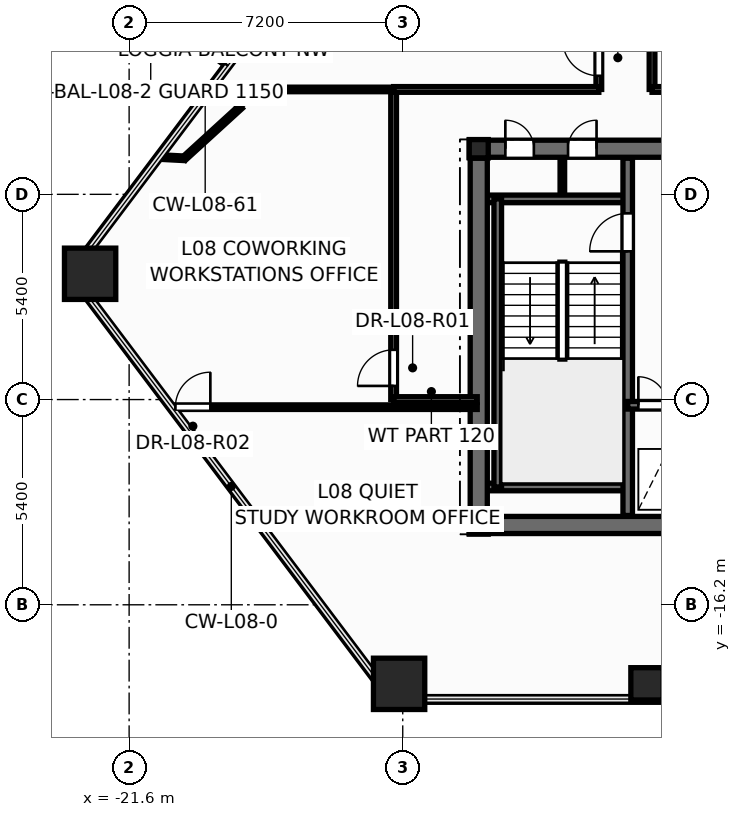
"""IFC4 building model, lengths in metres.
Left out: names, types, materials, properties, quantities, classifications, styles, units other than length and angle.
Written with IfcOpenShell. Run it as: python <this file> out.ifc"""

import sys

from ifc_helpers import new_model, si_unit, direction, frame, frame_2d, origin, origin_2d, place, context, subcontext, project, spatial, rectangle, hollow_rectangle, hollow_circle, i_section, extrude, element, fill, save


model = new_model("IFC4")
c1 = context("Model", 3, precision=1e-05, world=origin(), true_north=direction((0.0, 1.0)))
c2 = subcontext(c1, "Body", "Model", "MODEL_VIEW")
j1 = project(units=[si_unit("LENGTHUNIT", "METRE"), si_unit("PLANEANGLEUNIT", "RADIAN")], contexts=[c1])
p1 = place(None, origin())
s1 = spatial("IfcSite", under=j1, at=p1, CompositionType="ELEMENT")
p2 = place(p1, origin())
s2 = spatial("IfcBuilding", under=s1, at=p2, CompositionType="ELEMENT")
p3 = place(p2, frame((0.0, 0.0, 35.1)))
s3 = spatial("IfcBuildingStorey", under=s2, at=p3, CompositionType="ELEMENT", Elevation=35.1)
for number, where, z_axis, x_axis in (
    (1, (-22.626, -7.49, 0.0), (0.0, 0.0, 1.0), (1.0, 0.0, 0.0)),
    (2, (-14.496, -18.28, 0.0), (0.0, 0.0, 1.0), (1.0, 0.0, 0.0)),
):
    element("IfcColumn", number, at=place(p3, frame(where, z_axis=z_axis, x_axis=x_axis)), inside=s3, PredefinedType="COLUMN", context=c2, shape_type="SweptSolid", body=[
        extrude(hollow_rectangle(XDim=1.35, YDim=1.35, WallThickness=0.065, at=origin_2d()), origin(), (0.0, 0.0, 1.0), 3.6),
    ])
p4 = place(p3, frame((-7.973, -18.28, 0.0), z_axis=(0.0, 0.0, 1.0), x_axis=(1.0, 0.0, 0.0)))
e3 = element("IfcColumn", 3, at=p4, inside=s3, PredefinedType="COLUMN", context=c2, shape_type="SweptSolid", body=[
    extrude(hollow_circle(Radius=0.425, WallThickness=0.038, at=origin_2d()), origin(), (0.0, 0.0, 1.0), 3.6),
])
for number, where, z_axis, x_axis in (
    (4, (-12.4, -14.1, 0.0), (0.0, 0.0, 1.0), (1.0, 0.0, 0.0)),
    (5, (-12.4, -4.2, 0.0), (0.0, 0.0, 1.0), (1.0, 0.0, 0.0)),
):
    element("IfcColumn", number, at=place(p3, frame(where, z_axis=z_axis, x_axis=x_axis)), inside=s3, PredefinedType="COLUMN", context=c2, shape_type="SweptSolid", body=[
        extrude(i_section(OverallWidth=0.5, OverallDepth=0.482, WebThickness=0.04, FlangeThickness=0.045, at=origin_2d()), origin(), (0.0, 0.0, 1.0), 3.6),
    ])
p5 = place(p3, frame((-10.2, -5.52, 0.0), z_axis=(0.0, 0.0, 1.0), x_axis=(0.0, 1.0, 0.0)))
e6 = element("IfcWall", 6, at=p5, inside=s3, PredefinedType="PARTITIONING", context=c2, shape_type="SweptSolid", body=[
    extrude(rectangle(XDim=1.12, YDim=0.12, at=frame_2d((0.56, 0.0))), origin(), (0.0, 0.0, 1.0), 3.35),
])
p6 = place(p3, frame((-12.65, -14.1, 0.0), z_axis=(0.0, 0.0, 1.0), x_axis=(1.0, 0.0, 0.0)))
e7 = element("IfcWall", 7, at=p6, inside=s3, PredefinedType="SHEAR", context=c2, shape_type="SweptSolid", body=[
    extrude(rectangle(XDim=25.3, YDim=0.45, at=frame_2d((12.65, 0.0))), origin(), (0.0, 0.0, 1.0), 3.6),
])
p7 = place(p3, frame((-12.65, -4.2, 0.0), z_axis=(0.0, 0.0, 1.0), x_axis=(1.0, 0.0, 0.0)))
e8 = element("IfcWall", 8, at=p7, inside=s3, PredefinedType="SHEAR", context=c2, shape_type="SweptSolid", body=[
    extrude(rectangle(XDim=25.3, YDim=0.45, at=frame_2d((12.65, 0.0))), origin(), (0.0, 0.0, 1.0), 3.6),
])
p8 = place(p7, frame((0.95, 0.0, 0.0)))
e9 = element("IfcOpeningElement", 9, at=p8, cuts=e8, PredefinedType="OPENING", context=c2, shape_type="SweptSolid", body=[
    extrude(rectangle(XDim=0.756, YDim=2.054, at=frame_2d((0.375, 1.027))), frame((0.0, 0.235, 0.0), z_axis=(0.0, -1.0, 0.0), x_axis=(1.0, 0.0, 0.0)), (0.0, 0.0, 1.0), 0.47),
])
p9 = place(p7, frame((2.6, 0.0, 0.0)))
e10 = element("IfcOpeningElement", 10, at=p9, cuts=e8, PredefinedType="OPENING", context=c2, shape_type="SweptSolid", body=[
    extrude(rectangle(XDim=0.756, YDim=2.054, at=frame_2d((0.375, 1.027))), frame((0.0, 0.235, 0.0), z_axis=(0.0, -1.0, 0.0), x_axis=(1.0, 0.0, 0.0)), (0.0, 0.0, 1.0), 0.47),
])
p10 = place(p7, frame((21.85, 0.0, 0.0)))
e11 = element("IfcOpeningElement", 11, at=p10, cuts=e8, PredefinedType="OPENING", context=c2, shape_type="SweptSolid", body=[
    extrude(rectangle(XDim=0.756, YDim=2.054, at=frame_2d((0.375, 1.027))), frame((0.0, 0.235, 0.0), z_axis=(0.0, -1.0, 0.0), x_axis=(1.0, 0.0, 0.0)), (0.0, 0.0, 1.0), 0.47),
])
p11 = place(p7, frame((23.5, 0.0, 0.0)))
e12 = element("IfcOpeningElement", 12, at=p11, cuts=e8, PredefinedType="OPENING", context=c2, shape_type="SweptSolid", body=[
    extrude(rectangle(XDim=0.756, YDim=2.054, at=frame_2d((0.375, 1.027))), frame((0.0, 0.235, 0.0), z_axis=(0.0, -1.0, 0.0), x_axis=(1.0, 0.0, 0.0)), (0.0, 0.0, 1.0), 0.47),
])
p12 = place(p7, frame((5.85, 0.0, 0.0)))
e13 = element("IfcOpeningElement", 13, at=p12, cuts=e8, PredefinedType="OPENING", context=c2, shape_type="SweptSolid", body=[
    extrude(rectangle(XDim=1.006, YDim=2.104, at=frame_2d((0.5, 1.052))), frame((0.0, 0.235, 0.0), z_axis=(0.0, -1.0, 0.0), x_axis=(1.0, 0.0, 0.0)), (0.0, 0.0, 1.0), 0.47),
])
p13 = place(p7, frame((10.35, 0.0, 0.0)))
e14 = element("IfcOpeningElement", 14, at=p13, cuts=e8, PredefinedType="OPENING", context=c2, shape_type="SweptSolid", body=[
    extrude(rectangle(XDim=1.406, YDim=2.154, at=frame_2d((0.7, 1.077))), frame((0.0, 0.235, 0.0), z_axis=(0.0, -1.0, 0.0), x_axis=(1.0, 0.0, 0.0)), (0.0, 0.0, 1.0), 0.47),
])
p14 = place(p7, frame((18.45, 0.0, 0.0)))
e15 = element("IfcOpeningElement", 15, at=p14, cuts=e8, PredefinedType="OPENING", context=c2, shape_type="SweptSolid", body=[
    extrude(rectangle(XDim=1.006, YDim=2.104, at=frame_2d((0.5, 1.052))), frame((0.0, 0.235, 0.0), z_axis=(0.0, -1.0, 0.0), x_axis=(1.0, 0.0, 0.0)), (0.0, 0.0, 1.0), 0.47),
])
for number, where, z_axis, x_axis in (
    (16, (-12.35, -5.52, 0.0), (0.0, 0.0, 1.0), (1.0, 0.0, 0.0)),
    (17, (-12.35, -13.1, 0.0), (0.0, 0.0, 1.0), (1.0, 0.0, 0.0)),
):
    element("IfcWall", number, at=place(p3, frame(where, z_axis=z_axis, x_axis=x_axis)), inside=s3, PredefinedType="SOLIDWALL", context=c2, shape_type="SweptSolid", body=[
        extrude(rectangle(XDim=3.87, YDim=0.2, at=frame_2d((1.935, 0.0))), origin(), (0.0, 0.0, 1.0), 3.6),
    ])
p15 = place(p3, frame((-11.9, -13.1, 0.0), z_axis=(0.0, 0.0, 1.0), x_axis=(0.0, 1.0, 0.0)))
e18 = element("IfcWall", 18, at=p15, inside=s3, PredefinedType="SOLIDWALL", context=c2, shape_type="SweptSolid", body=[
    extrude(rectangle(XDim=7.58, YDim=0.2, at=frame_2d((3.79, 0.0))), origin(), (0.0, 0.0, 1.0), 3.6),
])
p16 = place(p3, frame((-8.48, -13.85, 0.0), z_axis=(0.0, 0.0, 1.0), x_axis=(0.0, 1.0, 0.0)))
e19 = element("IfcWall", 19, at=p16, inside=s3, PredefinedType="SHEAR", context=c2, shape_type="SweptSolid", body=[
    extrude(rectangle(XDim=9.4, YDim=0.25, at=frame_2d((4.7, 0.0))), origin(), (0.0, 0.0, 1.0), 3.6),
])
p17 = place(p16, frame((6.95, 0.0, 0.0)))
e20 = element("IfcOpeningElement", 20, at=p17, cuts=e19, PredefinedType="OPENING", context=c2, shape_type="SweptSolid", body=[
    extrude(rectangle(XDim=1.006, YDim=2.104, at=frame_2d((0.5, 1.052))), frame((0.0, 0.135, 0.0), z_axis=(0.0, -1.0, 0.0), x_axis=(1.0, 0.0, 0.0)), (0.0, 0.0, 1.0), 0.27),
])
p18 = place(p3, frame((-8.48, -10.95, 0.0), z_axis=(0.0, 0.0, 1.0), x_axis=(1.0, 0.0, 0.0)))
e21 = element("IfcWall", 21, at=p18, inside=s3, PredefinedType="SOLIDWALL", context=c2, shape_type="SweptSolid", body=[
    extrude(rectangle(XDim=3.36, YDim=0.2, at=frame_2d((1.68, 0.0))), origin(), (0.0, 0.0, 1.0), 3.6),
])
p19 = place(p18, frame((0.28, 0.0, 0.0)))
e22 = element("IfcOpeningElement", 22, at=p19, cuts=e21, PredefinedType="OPENING", context=c2, shape_type="SweptSolid", body=[
    extrude(rectangle(XDim=0.756, YDim=2.054, at=frame_2d((0.375, 1.027))), frame((0.0, 0.11, 0.0), z_axis=(0.0, -1.0, 0.0), x_axis=(1.0, 0.0, 0.0)), (0.0, 0.0, 1.0), 0.22),
])
p20 = place(p18, frame((1.85, 0.0, 0.0)))
e23 = element("IfcOpeningElement", 23, at=p20, cuts=e21, PredefinedType="OPENING", context=c2, shape_type="SweptSolid", body=[
    extrude(rectangle(XDim=1.106, YDim=2.104, at=frame_2d((0.55, 1.052))), frame((0.0, 0.11, 0.0), z_axis=(0.0, -1.0, 0.0), x_axis=(1.0, 0.0, 0.0)), (0.0, 0.0, 1.0), 0.22),
])
p21 = place(p3, frame((-12.4, -13.85, 0.0), z_axis=(0.0, 0.0, 1.0), x_axis=(0.0, 1.0, 0.0)))
e24 = element("IfcWall", 24, at=p21, inside=s3, PredefinedType="SHEAR", context=c2, shape_type="SweptSolid", body=[
    extrude(rectangle(XDim=9.4, YDim=0.45, at=frame_2d((4.7, 0.0))), origin(), (0.0, 0.0, 1.0), 3.6),
])
p22 = place(p3, frame((-9.24, -2.64, 0.0), z_axis=(0.0, 0.0, 1.0), x_axis=(0.0, 1.0, 0.0)))
e25 = element("IfcWall", 25, at=p22, inside=s3, PredefinedType="PARTITIONING", context=c2, shape_type="SweptSolid", body=[
    extrude(rectangle(XDim=8.84, YDim=0.15, at=frame_2d((4.42, 0.0))), origin(), (0.0, 0.0, 1.0), 2.325),
])
p23 = place(p22, frame((0.359, 0.0, 0.0)))
e26 = element("IfcOpeningElement", 26, at=p23, cuts=e25, PredefinedType="OPENING", context=c2, shape_type="SweptSolid", body=[
    extrude(rectangle(XDim=0.956, YDim=2.104, at=frame_2d((0.475, 1.052))), frame((0.0, 0.085, 0.0), z_axis=(0.0, -1.0, 0.0), x_axis=(1.0, 0.0, 0.0)), (0.0, 0.0, 1.0), 0.17),
])
p24 = place(p3, frame((-14.64, -10.8, 0.0), z_axis=(0.0, 0.0, 1.0), x_axis=(0.0, 1.0, 0.0)))
e27 = element("IfcWall", 27, at=p24, inside=s3, PredefinedType="PARTITIONING", context=c2, shape_type="SweptSolid", body=[
    extrude(rectangle(XDim=8.16, YDim=0.15, at=frame_2d((4.08, 0.0))), origin(), (0.0, 0.0, 1.0), 2.325),
])
p25 = place(p24, frame((0.359, 0.0, 0.0)))
e28 = element("IfcOpeningElement", 28, at=p25, cuts=e27, PredefinedType="OPENING", context=c2, shape_type="SweptSolid", body=[
    extrude(rectangle(XDim=0.956, YDim=2.104, at=frame_2d((0.475, 1.052))), frame((0.0, 0.085, 0.0), z_axis=(0.0, -1.0, 0.0), x_axis=(1.0, 0.0, 0.0)), (0.0, 0.0, 1.0), 0.17),
])
p26 = place(p3, frame((-20.483, -11.0, 0.0), z_axis=(0.0, 0.0, 1.0), x_axis=(1.0, 0.0, 0.0)))
e29 = element("IfcWall", 29, at=p26, inside=s3, PredefinedType="PARTITIONING", context=c2, shape_type="SweptSolid", body=[
    extrude(rectangle(XDim=8.043, YDim=0.12, at=frame_2d((4.021, 0.0))), origin(), (0.0, 0.0, 1.0), 2.713),
])
p27 = place(p26, frame((0.1, 0.0, 0.0)))
e30 = element("IfcOpeningElement", 30, at=p27, cuts=e29, PredefinedType="OPENING", context=c2, shape_type="SweptSolid", body=[
    extrude(rectangle(XDim=0.926, YDim=2.104, at=frame_2d((0.46, 1.052))), frame((0.0, 0.07, 0.0), z_axis=(0.0, -1.0, 0.0), x_axis=(1.0, 0.0, 0.0)), (0.0, 0.0, 1.0), 0.14),
])
p28 = place(p3, frame((-14.64, -2.64, 0.0), z_axis=(0.0, 0.0, 1.0), x_axis=(1.0, 0.0, 0.0)))
e31 = element("IfcWall", 31, at=p28, inside=s3, PredefinedType="PARTITIONING", context=c2, shape_type="SweptSolid", body=[
    extrude(rectangle(XDim=5.4, YDim=0.15, at=frame_2d((2.7, 0.0))), origin(), (0.0, 0.0, 1.0), 3.35),
])
p29 = place(p3, frame((-19.28, -2.64, 0.0), z_axis=(0.0, 0.0, 1.0), x_axis=(1.0, 0.0, 0.0)))
e32 = element("IfcWall", 32, at=p29, inside=s3, PredefinedType="PARTITIONING", context=c2, shape_type="SweptSolid", body=[
    extrude(rectangle(XDim=4.64, YDim=0.12, at=frame_2d((2.32, 0.0))), origin(), (0.0, 0.0, 1.0), 2.713),
])
p30 = place(p3, frame((-7.84, -2.64, 0.0), z_axis=(0.0, 0.0, 1.0), x_axis=(0.0, 1.0, 0.0)))
e33 = element("IfcWall", 33, at=p30, inside=s3, PredefinedType="PARTITIONING", context=c2, shape_type="SweptSolid", body=[
    extrude(rectangle(XDim=8.84, YDim=0.15, at=frame_2d((4.42, 0.0))), origin(), (0.0, 0.0, 1.0), 2.325),
])
p31 = place(p3, frame((-7.84, -2.64, 0.0), z_axis=(0.0, 0.0, 1.0), x_axis=(1.0, 0.0, 0.0)))
e34 = element("IfcWall", 34, at=p31, inside=s3, PredefinedType="PARTITIONING", context=c2, shape_type="SweptSolid", body=[
    extrude(rectangle(XDim=2.518, YDim=0.15, at=frame_2d((1.259, 0.0))), origin(), (0.0, 0.0, 1.0), 2.325),
])
p32 = place(p3, frame((-14.64, -10.8, 0.0), z_axis=(0.0, 0.0, 1.0), x_axis=(1.0, 0.0, 0.0)))
e35 = element("IfcWall", 35, at=p32, inside=s3, PredefinedType="PARTITIONING", context=c2, shape_type="SweptSolid", body=[
    extrude(rectangle(XDim=2.2, YDim=0.15, at=frame_2d((1.1, 0.0))), origin(), (0.0, 0.0, 1.0), 2.713),
])
p33 = place(p3, frame((-18.662, -3.096, 0.0), z_axis=(0.0, 0.0, 1.0), x_axis=(-0.738587935194, -0.674157149325, 0.0)))
e36 = element("IfcWall", 36, at=p33, inside=s3, PredefinedType="PARTITIONING", context=c2, shape_type="SweptSolid", body=[
    extrude(rectangle(XDim=2.012, YDim=0.12, at=frame_2d((1.006, 0.0))), origin(), (0.0, 0.0, 1.0), 3.35),
])
p34 = place(p3, frame((-19.287, -2.411, 0.0), z_axis=(0.0, 0.0, 1.0), x_axis=(0.674125797279, -0.738616551021, 0.0)))
e37 = element("IfcWall", 37, at=p34, inside=s3, PredefinedType="PARTITIONING", context=c2, shape_type="SweptSolid", body=[
    extrude(rectangle(XDim=0.927, YDim=0.12, at=frame_2d((0.464, 0.0))), origin(), (0.0, 0.0, 1.0), 2.713),
])
p35 = place(p3, frame((-20.148, -4.452, 0.0), z_axis=(0.0, 0.0, 1.0), x_axis=(-0.998648640801, 0.051970108975, 0.0)))
e38 = element("IfcWall", 38, at=p35, inside=s3, PredefinedType="PARTITIONING", context=c2, shape_type="SweptSolid", body=[
    extrude(rectangle(XDim=0.653, YDim=0.12, at=frame_2d((0.327, 0.0))), origin(), (0.0, 0.0, 1.0), 2.713),
])
p36 = place(p17, origin())
e39 = element("IfcDoor", 39, at=p36, inside=s3, OperationType="SINGLE_SWING_LEFT", PredefinedType="DOOR", context=c2, shape_type="SweptSolid", body=[
    extrude(rectangle(XDim=1.0, YDim=2.1, at=frame_2d((0.5, 1.05))), frame((0.0, 0.025, 0.0), z_axis=(0.0, -1.0, 0.0), x_axis=(1.0, 0.0, 0.0)), (0.0, 0.0, 1.0), 0.05),
])
fill(e20, e39)
p37 = place(p19, origin())
e40 = element("IfcDoor", 40, at=p37, inside=s3, OperationType="SINGLE_SWING_LEFT", PredefinedType="DOOR", context=c2, shape_type="SweptSolid", body=[
    extrude(rectangle(XDim=0.75, YDim=2.05, at=frame_2d((0.375, 1.025))), frame((0.0, 0.025, 0.0), z_axis=(0.0, -1.0, 0.0), x_axis=(1.0, 0.0, 0.0)), (0.0, 0.0, 1.0), 0.05),
])
fill(e22, e40)
p38 = place(p8, origin())
e41 = element("IfcDoor", 41, at=p38, inside=s3, OperationType="SINGLE_SWING_LEFT", PredefinedType="DOOR", context=c2, shape_type="SweptSolid", body=[
    extrude(rectangle(XDim=0.75, YDim=2.05, at=frame_2d((0.375, 1.025))), frame((0.0, 0.025, 0.0), z_axis=(0.0, -1.0, 0.0), x_axis=(1.0, 0.0, 0.0)), (0.0, 0.0, 1.0), 0.05),
])
fill(e9, e41)
p39 = place(p9, origin())
e42 = element("IfcDoor", 42, at=p39, inside=s3, OperationType="SINGLE_SWING_RIGHT", PredefinedType="DOOR", context=c2, shape_type="SweptSolid", body=[
    extrude(rectangle(XDim=0.75, YDim=2.05, at=frame_2d((0.375, 1.025))), frame((0.0, 0.025, 0.0), z_axis=(0.0, -1.0, 0.0), x_axis=(1.0, 0.0, 0.0)), (0.0, 0.0, 1.0), 0.05),
])
fill(e10, e42)
p40 = place(p25, origin())
e43 = element("IfcDoor", 43, at=p40, inside=s3, OperationType="SINGLE_SWING_LEFT", PredefinedType="DOOR", context=c2, shape_type="SweptSolid", body=[
    extrude(rectangle(XDim=0.95, YDim=2.1, at=frame_2d((0.475, 1.05))), frame((0.0, 0.025, 0.0), z_axis=(0.0, -1.0, 0.0), x_axis=(1.0, 0.0, 0.0)), (0.0, 0.0, 1.0), 0.05),
])
fill(e28, e43)
p41 = place(p27, origin())
e44 = element("IfcDoor", 44, at=p41, inside=s3, OperationType="SINGLE_SWING_RIGHT", PredefinedType="DOOR", context=c2, shape_type="SweptSolid", body=[
    extrude(rectangle(XDim=0.92, YDim=2.1, at=frame_2d((0.46, 1.05))), frame((0.0, 0.025, 0.0), z_axis=(0.0, -1.0, 0.0), x_axis=(1.0, 0.0, 0.0)), (0.0, 0.0, 1.0), 0.05),
])
fill(e30, e44)
p42 = place(p23, origin())
e45 = element("IfcDoor", 45, at=p42, inside=s3, OperationType="SINGLE_SWING_RIGHT", PredefinedType="DOOR", context=c2, shape_type="SweptSolid", body=[
    extrude(rectangle(XDim=0.95, YDim=2.1, at=frame_2d((0.475, 1.05))), frame((0.0, 0.025, 0.0), z_axis=(0.0, -1.0, 0.0), x_axis=(1.0, 0.0, 0.0)), (0.0, 0.0, 1.0), 0.05),
])
fill(e26, e45)
save(model, sys.argv[1])
